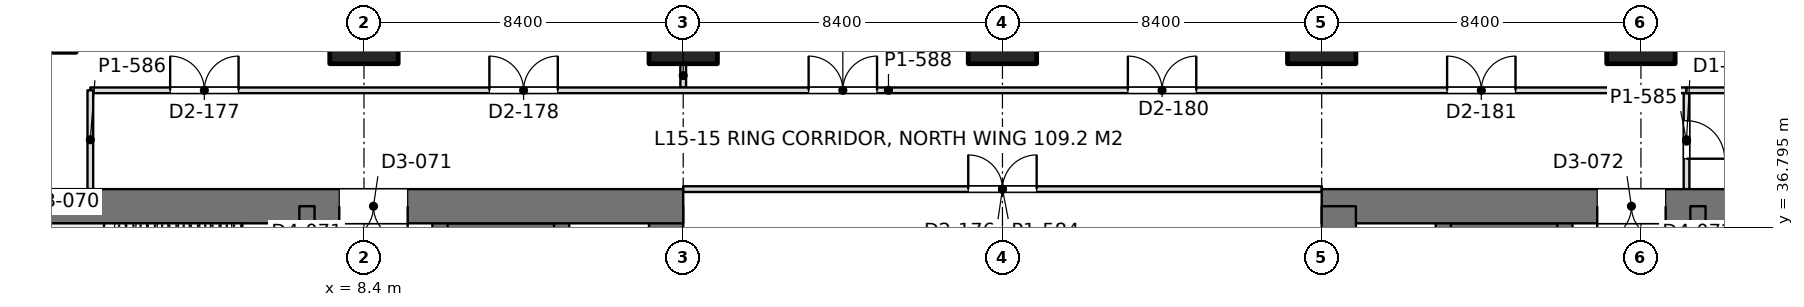
"""IFC4 building model, lengths in metres.
Left out: names, types, materials, properties, quantities, classifications, styles, units other than length and angle.
Written with IfcOpenShell. Run it as: python <this file> out.ifc"""

import sys

from ifc_helpers import new_model, si_unit, direction, frame, frame_2d, origin, origin_2d, place, context, subcontext, project, spatial, rectangle, extrude, element, fill, save


model = new_model("IFC4")
c1 = context("Model", 3, precision=1e-05, world=origin(), true_north=direction((0.0, 1.0)))
c2 = subcontext(c1, "Body", "Model", "MODEL_VIEW")
j1 = project(units=[si_unit("LENGTHUNIT", "METRE"), si_unit("PLANEANGLEUNIT", "RADIAN")], contexts=[c1])
p1 = place(None, origin())
s1 = spatial("IfcSite", under=j1, at=p1, CompositionType="ELEMENT")
p2 = place(p1, origin())
s2 = spatial("IfcBuilding", under=s1, at=p2, CompositionType="ELEMENT")
p3 = place(p2, frame((0.0, 0.0, 68.4)))
s3 = spatial("IfcBuildingStorey", under=s2, at=p3, CompositionType="ELEMENT", Elevation=68.4)
for number, where, z_axis, x_axis in (
    (1, (8.4, 42.0, 0.0), (0.0, 0.0, 1.0), (1.0, 0.0, 0.0)),
    (2, (16.8, 42.0, 0.0), (0.0, 0.0, 1.0), (1.0, 0.0, 0.0)),
    (3, (25.2, 42.0, 0.0), (0.0, 0.0, 1.0), (1.0, 0.0, 0.0)),
    (4, (33.6, 42.0, 0.0), (0.0, 0.0, 1.0), (1.0, 0.0, 0.0)),
    (5, (42.0, 42.0, 0.0), (0.0, 0.0, 1.0), (1.0, 0.0, 0.0)),
):
    element("IfcColumn", number, at=place(p3, frame(where, z_axis=z_axis, x_axis=x_axis)), inside=s3, PredefinedType="COLUMN", context=c2, shape_type="SweptSolid", body=[
        extrude(rectangle(XDim=1.8, YDim=1.8, at=origin_2d()), origin(), (0.0, 0.0, 1.0), 4.5),
    ])
p4 = place(p3, frame((-1.2, 37.35, 0.0), z_axis=(0.0, 0.0, 1.0), x_axis=(1.0, 0.0, 0.0)))
e6 = element("IfcWall", 6, at=p4, inside=s3, PredefinedType="SHEAR", context=c2, shape_type="SweptSolid", body=[
    extrude(rectangle(XDim=18.0, YDim=0.9, at=frame_2d((9.0, 0.0))), origin(), (0.0, 0.0, 1.0), 4.5),
])
p5 = place(p4, frame((8.95, 0.0, 0.0)))
e7 = element("IfcOpeningElement", 7, at=p5, cuts=e6, PredefinedType="OPENING", context=c2, shape_type="SweptSolid", body=[
    extrude(rectangle(XDim=1.8, YDim=2.4, at=frame_2d((0.9, 1.2))), frame((0.0, 0.46, 0.0), z_axis=(0.0, -1.0, 0.0), x_axis=(1.0, 0.0, 0.0)), (0.0, 0.0, 1.0), 0.92),
])
p6 = place(p3, frame((16.35, 13.05, 0.0), z_axis=(0.0, 0.0, 1.0), x_axis=(0.0, 1.0, 0.0)))
e8 = element("IfcWall", 8, at=p6, inside=s3, PredefinedType="SHEAR", context=c2, shape_type="SweptSolid", body=[
    extrude(rectangle(XDim=24.3, YDim=0.9, at=frame_2d((12.15, 0.0))), origin(), (0.0, 0.0, 1.0), 4.5),
])
p7 = place(p3, frame((6.9, 13.05, 0.0), z_axis=(0.0, 0.0, 1.0), x_axis=(0.0, 1.0, 0.0)))
e9 = element("IfcWall", 9, at=p7, inside=s3, PredefinedType="SHEAR", context=c2, shape_type="SweptSolid", body=[
    extrude(rectangle(XDim=24.3, YDim=0.4, at=frame_2d((12.15, 0.0))), origin(), (0.0, 0.0, 1.0), 4.5),
])
p8 = place(p7, frame((1.3, 0.0, 0.0)))
e10 = element("IfcOpeningElement", 10, at=p8, cuts=e9, PredefinedType="OPENING", context=c2, shape_type="SweptSolid", body=[
    extrude(rectangle(XDim=1.0, YDim=2.2, at=frame_2d((0.5, 1.1))), frame((0.0, 0.21, 0.0), z_axis=(0.0, -1.0, 0.0), x_axis=(1.0, 0.0, 0.0)), (0.0, 0.0, 1.0), 0.42),
])
p9 = place(p7, frame((22.0, 0.0, 0.0)))
e11 = element("IfcOpeningElement", 11, at=p9, cuts=e9, PredefinedType="OPENING", context=c2, shape_type="SweptSolid", body=[
    extrude(rectangle(XDim=1.0, YDim=2.2, at=frame_2d((0.5, 1.1))), frame((0.0, 0.21, 0.0), z_axis=(0.0, -1.0, 0.0), x_axis=(1.0, 0.0, 0.0)), (0.0, 0.0, 1.0), 0.42),
])
p10 = place(p7, frame((5.55, 0.0, 0.0)))
e12 = element("IfcOpeningElement", 12, at=p10, cuts=e9, PredefinedType="OPENING", context=c2, shape_type="SweptSolid", body=[
    extrude(rectangle(XDim=1.0, YDim=2.2, at=frame_2d((0.5, 1.1))), frame((0.0, 0.21, 0.0), z_axis=(0.0, -1.0, 0.0), x_axis=(1.0, 0.0, 0.0)), (0.0, 0.0, 1.0), 0.42),
])
p11 = place(p7, frame((9.55, 0.0, 0.0)))
e13 = element("IfcOpeningElement", 13, at=p11, cuts=e9, PredefinedType="OPENING", context=c2, shape_type="SweptSolid", body=[
    extrude(rectangle(XDim=1.0, YDim=2.2, at=frame_2d((0.5, 1.1))), frame((0.0, 0.21, 0.0), z_axis=(0.0, -1.0, 0.0), x_axis=(1.0, 0.0, 0.0)), (0.0, 0.0, 1.0), 0.42),
])
p12 = place(p7, frame((12.8, 0.0, 0.0)))
e14 = element("IfcOpeningElement", 14, at=p12, cuts=e9, PredefinedType="OPENING", context=c2, shape_type="SweptSolid", body=[
    extrude(rectangle(XDim=1.1, YDim=2.2, at=frame_2d((0.55, 1.1))), frame((0.0, 0.21, 0.0), z_axis=(0.0, -1.0, 0.0), x_axis=(1.0, 0.0, 0.0)), (0.0, 0.0, 1.0), 0.42),
])
p13 = place(p7, frame((15.538, 0.0, 0.0)))
e15 = element("IfcOpeningElement", 15, at=p13, cuts=e9, PredefinedType="OPENING", context=c2, shape_type="SweptSolid", body=[
    extrude(rectangle(XDim=1.1, YDim=2.2, at=frame_2d((0.55, 1.1))), frame((0.0, 0.21, 0.0), z_axis=(0.0, -1.0, 0.0), x_axis=(1.0, 0.0, 0.0)), (0.0, 0.0, 1.0), 0.42),
])
p14 = place(p7, frame((18.262, 0.0, 0.0)))
e16 = element("IfcOpeningElement", 16, at=p14, cuts=e9, PredefinedType="OPENING", context=c2, shape_type="SweptSolid", body=[
    extrude(rectangle(XDim=1.1, YDim=2.2, at=frame_2d((0.55, 1.1))), frame((0.0, 0.21, 0.0), z_axis=(0.0, -1.0, 0.0), x_axis=(1.0, 0.0, 0.0)), (0.0, 0.0, 1.0), 0.42),
])
p15 = place(p3, frame((10.4, 13.05, 0.0), z_axis=(0.0, 0.0, 1.0), x_axis=(0.0, 1.0, 0.0)))
e17 = element("IfcWall", 17, at=p15, inside=s3, PredefinedType="SHEAR", context=c2, shape_type="SweptSolid", body=[
    extrude(rectangle(XDim=24.3, YDim=0.4, at=frame_2d((12.15, 0.0))), origin(), (0.0, 0.0, 1.0), 4.5),
])
p16 = place(p15, frame((1.5, 0.0, 0.0)))
e18 = element("IfcOpeningElement", 18, at=p16, cuts=e17, PredefinedType="OPENING", context=c2, shape_type="SweptSolid", body=[
    extrude(rectangle(XDim=1.1, YDim=2.2, at=frame_2d((0.55, 1.1))), frame((0.0, 0.21, 0.0), z_axis=(0.0, -1.0, 0.0), x_axis=(1.0, 0.0, 0.0)), (0.0, 0.0, 1.0), 0.42),
])
p17 = place(p15, frame((4.35, 0.0, 0.0)))
e19 = element("IfcOpeningElement", 19, at=p17, cuts=e17, PredefinedType="OPENING", context=c2, shape_type="SweptSolid", body=[
    extrude(rectangle(XDim=1.1, YDim=2.2, at=frame_2d((0.55, 1.1))), frame((0.0, 0.21, 0.0), z_axis=(0.0, -1.0, 0.0), x_axis=(1.0, 0.0, 0.0)), (0.0, 0.0, 1.0), 0.42),
])
p18 = place(p15, frame((7.2, 0.0, 0.0)))
e20 = element("IfcOpeningElement", 20, at=p18, cuts=e17, PredefinedType="OPENING", context=c2, shape_type="SweptSolid", body=[
    extrude(rectangle(XDim=1.1, YDim=2.2, at=frame_2d((0.55, 1.1))), frame((0.0, 0.21, 0.0), z_axis=(0.0, -1.0, 0.0), x_axis=(1.0, 0.0, 0.0)), (0.0, 0.0, 1.0), 0.42),
])
p19 = place(p15, frame((21.45, 0.0, 0.0)))
e21 = element("IfcOpeningElement", 21, at=p19, cuts=e17, PredefinedType="OPENING", context=c2, shape_type="SweptSolid", body=[
    extrude(rectangle(XDim=1.1, YDim=2.2, at=frame_2d((0.55, 1.1))), frame((0.0, 0.21, 0.0), z_axis=(0.0, -1.0, 0.0), x_axis=(1.0, 0.0, 0.0)), (0.0, 0.0, 1.0), 0.42),
])
p20 = place(p3, frame((13.6, 13.05, 0.0), z_axis=(0.0, 0.0, 1.0), x_axis=(0.0, 1.0, 0.0)))
e22 = element("IfcWall", 22, at=p20, inside=s3, PredefinedType="SHEAR", context=c2, shape_type="SweptSolid", body=[
    extrude(rectangle(XDim=24.3, YDim=0.4, at=frame_2d((12.15, 0.0))), origin(), (0.0, 0.0, 1.0), 4.5),
])
p21 = place(p3, frame((10.4, 36.625, 0.0), z_axis=(0.0, 0.0, 1.0), x_axis=(1.0, 0.0, 0.0)))
e23 = element("IfcWall", 23, at=p21, inside=s3, PredefinedType="SHEAR", context=c2, shape_type="SweptSolid", body=[
    extrude(rectangle(XDim=3.2, YDim=0.55, at=frame_2d((1.6, 0.0))), origin(), (0.0, 0.0, 1.0), 4.5),
])
p22 = place(p3, frame((33.6, 37.35, 0.0), z_axis=(0.0, 0.0, 1.0), x_axis=(1.0, 0.0, 0.0)))
e24 = element("IfcWall", 24, at=p22, inside=s3, PredefinedType="SHEAR", context=c2, shape_type="SweptSolid", body=[
    extrude(rectangle(XDim=18.0, YDim=0.9, at=frame_2d((9.0, 0.0))), origin(), (0.0, 0.0, 1.0), 4.5),
])
p23 = place(p22, frame((7.25, 0.0, 0.0)))
e25 = element("IfcOpeningElement", 25, at=p23, cuts=e24, PredefinedType="OPENING", context=c2, shape_type="SweptSolid", body=[
    extrude(rectangle(XDim=1.8, YDim=2.4, at=frame_2d((0.9, 1.2))), frame((0.0, 0.46, 0.0), z_axis=(0.0, -1.0, 0.0), x_axis=(1.0, 0.0, 0.0)), (0.0, 0.0, 1.0), 0.92),
])
p24 = place(p3, frame((34.05, 13.05, 0.0), z_axis=(0.0, 0.0, 1.0), x_axis=(0.0, 1.0, 0.0)))
e26 = element("IfcWall", 26, at=p24, inside=s3, PredefinedType="SHEAR", context=c2, shape_type="SweptSolid", body=[
    extrude(rectangle(XDim=24.3, YDim=0.9, at=frame_2d((12.15, 0.0))), origin(), (0.0, 0.0, 1.0), 4.5),
])
p25 = place(p3, frame((43.5, 13.05, 0.0), z_axis=(0.0, 0.0, 1.0), x_axis=(0.0, 1.0, 0.0)))
e27 = element("IfcWall", 27, at=p25, inside=s3, PredefinedType="SHEAR", context=c2, shape_type="SweptSolid", body=[
    extrude(rectangle(XDim=24.3, YDim=0.4, at=frame_2d((12.15, 0.0))), origin(), (0.0, 0.0, 1.0), 4.5),
])
p26 = place(p25, frame((1.3, 0.0, 0.0)))
e28 = element("IfcOpeningElement", 28, at=p26, cuts=e27, PredefinedType="OPENING", context=c2, shape_type="SweptSolid", body=[
    extrude(rectangle(XDim=1.0, YDim=2.2, at=frame_2d((0.5, 1.1))), frame((0.0, 0.21, 0.0), z_axis=(0.0, -1.0, 0.0), x_axis=(1.0, 0.0, 0.0)), (0.0, 0.0, 1.0), 0.42),
])
p27 = place(p25, frame((22.0, 0.0, 0.0)))
e29 = element("IfcOpeningElement", 29, at=p27, cuts=e27, PredefinedType="OPENING", context=c2, shape_type="SweptSolid", body=[
    extrude(rectangle(XDim=1.0, YDim=2.2, at=frame_2d((0.5, 1.1))), frame((0.0, 0.21, 0.0), z_axis=(0.0, -1.0, 0.0), x_axis=(1.0, 0.0, 0.0)), (0.0, 0.0, 1.0), 0.42),
])
p28 = place(p25, frame((5.55, 0.0, 0.0)))
e30 = element("IfcOpeningElement", 30, at=p28, cuts=e27, PredefinedType="OPENING", context=c2, shape_type="SweptSolid", body=[
    extrude(rectangle(XDim=1.0, YDim=2.2, at=frame_2d((0.5, 1.1))), frame((0.0, 0.21, 0.0), z_axis=(0.0, -1.0, 0.0), x_axis=(1.0, 0.0, 0.0)), (0.0, 0.0, 1.0), 0.42),
])
p29 = place(p25, frame((9.55, 0.0, 0.0)))
e31 = element("IfcOpeningElement", 31, at=p29, cuts=e27, PredefinedType="OPENING", context=c2, shape_type="SweptSolid", body=[
    extrude(rectangle(XDim=1.0, YDim=2.2, at=frame_2d((0.5, 1.1))), frame((0.0, 0.21, 0.0), z_axis=(0.0, -1.0, 0.0), x_axis=(1.0, 0.0, 0.0)), (0.0, 0.0, 1.0), 0.42),
])
p30 = place(p25, frame((12.8, 0.0, 0.0)))
e32 = element("IfcOpeningElement", 32, at=p30, cuts=e27, PredefinedType="OPENING", context=c2, shape_type="SweptSolid", body=[
    extrude(rectangle(XDim=1.1, YDim=2.2, at=frame_2d((0.55, 1.1))), frame((0.0, 0.21, 0.0), z_axis=(0.0, -1.0, 0.0), x_axis=(1.0, 0.0, 0.0)), (0.0, 0.0, 1.0), 0.42),
])
p31 = place(p25, frame((15.538, 0.0, 0.0)))
e33 = element("IfcOpeningElement", 33, at=p31, cuts=e27, PredefinedType="OPENING", context=c2, shape_type="SweptSolid", body=[
    extrude(rectangle(XDim=1.1, YDim=2.2, at=frame_2d((0.55, 1.1))), frame((0.0, 0.21, 0.0), z_axis=(0.0, -1.0, 0.0), x_axis=(1.0, 0.0, 0.0)), (0.0, 0.0, 1.0), 0.42),
])
p32 = place(p25, frame((18.262, 0.0, 0.0)))
e34 = element("IfcOpeningElement", 34, at=p32, cuts=e27, PredefinedType="OPENING", context=c2, shape_type="SweptSolid", body=[
    extrude(rectangle(XDim=1.1, YDim=2.2, at=frame_2d((0.55, 1.1))), frame((0.0, 0.21, 0.0), z_axis=(0.0, -1.0, 0.0), x_axis=(1.0, 0.0, 0.0)), (0.0, 0.0, 1.0), 0.42),
])
p33 = place(p3, frame((40.0, 13.05, 0.0), z_axis=(0.0, 0.0, 1.0), x_axis=(0.0, 1.0, 0.0)))
e35 = element("IfcWall", 35, at=p33, inside=s3, PredefinedType="SHEAR", context=c2, shape_type="SweptSolid", body=[
    extrude(rectangle(XDim=24.3, YDim=0.4, at=frame_2d((12.15, 0.0))), origin(), (0.0, 0.0, 1.0), 4.5),
])
p34 = place(p33, frame((1.5, 0.0, 0.0)))
e36 = element("IfcOpeningElement", 36, at=p34, cuts=e35, PredefinedType="OPENING", context=c2, shape_type="SweptSolid", body=[
    extrude(rectangle(XDim=1.1, YDim=2.2, at=frame_2d((0.55, 1.1))), frame((0.0, 0.21, 0.0), z_axis=(0.0, -1.0, 0.0), x_axis=(1.0, 0.0, 0.0)), (0.0, 0.0, 1.0), 0.42),
])
p35 = place(p33, frame((4.35, 0.0, 0.0)))
e37 = element("IfcOpeningElement", 37, at=p35, cuts=e35, PredefinedType="OPENING", context=c2, shape_type="SweptSolid", body=[
    extrude(rectangle(XDim=1.1, YDim=2.2, at=frame_2d((0.55, 1.1))), frame((0.0, 0.21, 0.0), z_axis=(0.0, -1.0, 0.0), x_axis=(1.0, 0.0, 0.0)), (0.0, 0.0, 1.0), 0.42),
])
p36 = place(p33, frame((7.2, 0.0, 0.0)))
e38 = element("IfcOpeningElement", 38, at=p36, cuts=e35, PredefinedType="OPENING", context=c2, shape_type="SweptSolid", body=[
    extrude(rectangle(XDim=1.1, YDim=2.2, at=frame_2d((0.55, 1.1))), frame((0.0, 0.21, 0.0), z_axis=(0.0, -1.0, 0.0), x_axis=(1.0, 0.0, 0.0)), (0.0, 0.0, 1.0), 0.42),
])
p37 = place(p33, frame((21.45, 0.0, 0.0)))
e39 = element("IfcOpeningElement", 39, at=p37, cuts=e35, PredefinedType="OPENING", context=c2, shape_type="SweptSolid", body=[
    extrude(rectangle(XDim=1.1, YDim=2.2, at=frame_2d((0.55, 1.1))), frame((0.0, 0.21, 0.0), z_axis=(0.0, -1.0, 0.0), x_axis=(1.0, 0.0, 0.0)), (0.0, 0.0, 1.0), 0.42),
])
p38 = place(p3, frame((36.8, 13.05, 0.0), z_axis=(0.0, 0.0, 1.0), x_axis=(0.0, 1.0, 0.0)))
e40 = element("IfcWall", 40, at=p38, inside=s3, PredefinedType="SHEAR", context=c2, shape_type="SweptSolid", body=[
    extrude(rectangle(XDim=24.3, YDim=0.4, at=frame_2d((12.15, 0.0))), origin(), (0.0, 0.0, 1.0), 4.5),
])
p39 = place(p3, frame((40.0, 36.625, 0.0), z_axis=(0.0, 0.0, 1.0), x_axis=(-1.0, 0.0, 0.0)))
e41 = element("IfcWall", 41, at=p39, inside=s3, PredefinedType="SHEAR", context=c2, shape_type="SweptSolid", body=[
    extrude(rectangle(XDim=3.2, YDim=0.55, at=frame_2d((1.6, 0.0))), origin(), (0.0, 0.0, 1.0), 4.5),
])
p40 = place(p3, frame((16.8, 40.474, 0.0), z_axis=(0.0, 0.0, 1.0), x_axis=(0.0, 1.0, 0.0)))
e42 = element("IfcWall", 42, at=p40, inside=s3, PredefinedType="PARTITIONING", context=c2, shape_type="SweptSolid", body=[
    extrude(rectangle(XDim=0.627, YDim=0.15, at=frame_2d((0.313, 0.0))), origin(), (0.0, 0.0, 1.0), 3.98),
])
p41 = place(p3, frame((1.2, 40.4, 0.0), z_axis=(0.0, 0.0, 1.0), x_axis=(1.0, 0.0, 0.0)))
e43 = element("IfcWall", 43, at=p41, inside=s3, PredefinedType="PARTITIONING", context=c2, shape_type="SweptSolid", body=[
    extrude(rectangle(XDim=42.002, YDim=0.15, at=frame_2d((21.001, 0.0))), origin(), (0.0, 0.0, 1.0), 3.74),
])
p42 = place(p41, frame((2.1, 0.0, 0.0)))
e44 = element("IfcOpeningElement", 44, at=p42, cuts=e43, PredefinedType="OPENING", context=c2, shape_type="SweptSolid", body=[
    extrude(rectangle(XDim=1.8, YDim=2.2, at=frame_2d((0.9, 1.1))), frame((0.0, 0.085, 0.0), z_axis=(0.0, -1.0, 0.0), x_axis=(1.0, 0.0, 0.0)), (0.0, 0.0, 1.0), 0.17),
])
p43 = place(p41, frame((10.5, 0.0, 0.0)))
e45 = element("IfcOpeningElement", 45, at=p43, cuts=e43, PredefinedType="OPENING", context=c2, shape_type="SweptSolid", body=[
    extrude(rectangle(XDim=1.8, YDim=2.2, at=frame_2d((0.9, 1.1))), frame((0.0, 0.085, 0.0), z_axis=(0.0, -1.0, 0.0), x_axis=(1.0, 0.0, 0.0)), (0.0, 0.0, 1.0), 0.17),
])
p44 = place(p41, frame((18.9, 0.0, 0.0)))
e46 = element("IfcOpeningElement", 46, at=p44, cuts=e43, PredefinedType="OPENING", context=c2, shape_type="SweptSolid", body=[
    extrude(rectangle(XDim=1.8, YDim=2.2, at=frame_2d((0.9, 1.1))), frame((0.0, 0.085, 0.0), z_axis=(0.0, -1.0, 0.0), x_axis=(1.0, 0.0, 0.0)), (0.0, 0.0, 1.0), 0.17),
])
p45 = place(p41, frame((27.3, 0.0, 0.0)))
e47 = element("IfcOpeningElement", 47, at=p45, cuts=e43, PredefinedType="OPENING", context=c2, shape_type="SweptSolid", body=[
    extrude(rectangle(XDim=1.8, YDim=2.2, at=frame_2d((0.9, 1.1))), frame((0.0, 0.085, 0.0), z_axis=(0.0, -1.0, 0.0), x_axis=(1.0, 0.0, 0.0)), (0.0, 0.0, 1.0), 0.17),
])
p46 = place(p41, frame((35.7, 0.0, 0.0)))
e48 = element("IfcOpeningElement", 48, at=p46, cuts=e43, PredefinedType="OPENING", context=c2, shape_type="SweptSolid", body=[
    extrude(rectangle(XDim=1.8, YDim=2.2, at=frame_2d((0.9, 1.1))), frame((0.0, 0.085, 0.0), z_axis=(0.0, -1.0, 0.0), x_axis=(1.0, 0.0, 0.0)), (0.0, 0.0, 1.0), 0.17),
])
p47 = place(p3, frame((1.2, 37.8, 0.0), z_axis=(0.0, 0.0, 1.0), x_axis=(0.0, 1.0, 0.0)))
e49 = element("IfcWall", 49, at=p47, inside=s3, PredefinedType="PARTITIONING", context=c2, shape_type="SweptSolid", body=[
    extrude(rectangle(XDim=2.6, YDim=0.15, at=frame_2d((1.3, 0.0))), origin(), (0.0, 0.0, 1.0), 4.34),
])
p48 = place(p3, frame((43.2, 37.8, 0.0), z_axis=(0.0, 0.0, 1.0), x_axis=(0.0, 1.0, 0.0)))
e50 = element("IfcWall", 50, at=p48, inside=s3, PredefinedType="PARTITIONING", context=c2, shape_type="SweptSolid", body=[
    extrude(rectangle(XDim=2.526, YDim=0.15, at=frame_2d((1.263, 0.0))), origin(), (0.0, 0.0, 1.0), 4.34),
])
p49 = place(p48, frame((0.8, 0.0, 0.0)))
e51 = element("IfcOpeningElement", 51, at=p49, cuts=e50, PredefinedType="OPENING", context=c2, shape_type="SweptSolid", body=[
    extrude(rectangle(XDim=1.0, YDim=2.2, at=frame_2d((0.5, 1.1))), frame((0.0, 0.085, 0.0), z_axis=(0.0, -1.0, 0.0), x_axis=(1.0, 0.0, 0.0)), (0.0, 0.0, 1.0), 0.17),
])
p50 = place(p3, frame((43.198, 40.4, 0.0), z_axis=(0.0, 0.0, 1.0), x_axis=(1.0, 0.0, 0.0)))
e52 = element("IfcWall", 52, at=p50, inside=s3, PredefinedType="PARTITIONING", context=c2, shape_type="SweptSolid", body=[
    extrude(rectangle(XDim=6.002, YDim=0.15, at=frame_2d((3.001, 0.0))), origin(), (0.0, 0.0, 1.0), 3.98),
])
p51 = place(p3, frame((16.798, 37.8, 0.0), z_axis=(0.0, 0.0, 1.0), x_axis=(1.0, 0.0, 0.0)))
e53 = element("IfcWall", 53, at=p51, inside=s3, PredefinedType="PARTITIONING", context=c2, shape_type="SweptSolid", body=[
    extrude(rectangle(XDim=16.804, YDim=0.15, at=frame_2d((8.402, 0.0))), origin(), (0.0, 0.0, 1.0), 3.74),
])
p52 = place(p51, frame((7.502, 0.0, 0.0)))
e54 = element("IfcOpeningElement", 54, at=p52, cuts=e53, PredefinedType="OPENING", context=c2, shape_type="SweptSolid", body=[
    extrude(rectangle(XDim=1.8, YDim=2.2, at=frame_2d((0.9, 1.1))), frame((0.0, 0.085, 0.0), z_axis=(0.0, -1.0, 0.0), x_axis=(1.0, 0.0, 0.0)), (0.0, 0.0, 1.0), 0.17),
])
p53 = place(p5, frame((1.8, 0.0, 0.0), z_axis=(0.0, 0.0, 1.0), x_axis=(-1.0, 0.0, 0.0)))
e55 = element("IfcDoor", 55, at=p53, inside=s3, OperationType="DOUBLE_DOOR_SINGLE_SWING", PredefinedType="DOOR", context=c2, shape_type="SweptSolid", body=[
    extrude(rectangle(XDim=1.8, YDim=2.4, at=frame_2d((0.9, 1.2))), frame((0.0, 0.025, 0.0), z_axis=(0.0, -1.0, 0.0), x_axis=(1.0, 0.0, 0.0)), (0.0, 0.0, 1.0), 0.05),
])
fill(e7, e55)
p54 = place(p23, frame((1.8, 0.0, 0.0), z_axis=(0.0, 0.0, 1.0), x_axis=(-1.0, 0.0, 0.0)))
e56 = element("IfcDoor", 56, at=p54, inside=s3, OperationType="DOUBLE_DOOR_SINGLE_SWING", PredefinedType="DOOR", context=c2, shape_type="SweptSolid", body=[
    extrude(rectangle(XDim=1.8, YDim=2.4, at=frame_2d((0.9, 1.2))), frame((0.0, 0.025, 0.0), z_axis=(0.0, -1.0, 0.0), x_axis=(1.0, 0.0, 0.0)), (0.0, 0.0, 1.0), 0.05),
])
fill(e25, e56)
p55 = place(p42, origin())
e57 = element("IfcDoor", 57, at=p55, inside=s3, OperationType="DOUBLE_DOOR_SINGLE_SWING", PredefinedType="DOOR", context=c2, shape_type="SweptSolid", body=[
    extrude(rectangle(XDim=1.8, YDim=2.2, at=frame_2d((0.9, 1.1))), frame((0.0, 0.025, 0.0), z_axis=(0.0, -1.0, 0.0), x_axis=(1.0, 0.0, 0.0)), (0.0, 0.0, 1.0), 0.05),
])
fill(e44, e57)
p56 = place(p43, origin())
e58 = element("IfcDoor", 58, at=p56, inside=s3, OperationType="DOUBLE_DOOR_SINGLE_SWING", PredefinedType="DOOR", context=c2, shape_type="SweptSolid", body=[
    extrude(rectangle(XDim=1.8, YDim=2.2, at=frame_2d((0.9, 1.1))), frame((0.0, 0.025, 0.0), z_axis=(0.0, -1.0, 0.0), x_axis=(1.0, 0.0, 0.0)), (0.0, 0.0, 1.0), 0.05),
])
fill(e45, e58)
p57 = place(p44, origin())
e59 = element("IfcDoor", 59, at=p57, inside=s3, OperationType="DOUBLE_DOOR_SINGLE_SWING", PredefinedType="DOOR", context=c2, shape_type="SweptSolid", body=[
    extrude(rectangle(XDim=1.8, YDim=2.2, at=frame_2d((0.9, 1.1))), frame((0.0, 0.025, 0.0), z_axis=(0.0, -1.0, 0.0), x_axis=(1.0, 0.0, 0.0)), (0.0, 0.0, 1.0), 0.05),
])
fill(e46, e59)
p58 = place(p45, origin())
e60 = element("IfcDoor", 60, at=p58, inside=s3, OperationType="DOUBLE_DOOR_SINGLE_SWING", PredefinedType="DOOR", context=c2, shape_type="SweptSolid", body=[
    extrude(rectangle(XDim=1.8, YDim=2.2, at=frame_2d((0.9, 1.1))), frame((0.0, 0.025, 0.0), z_axis=(0.0, -1.0, 0.0), x_axis=(1.0, 0.0, 0.0)), (0.0, 0.0, 1.0), 0.05),
])
fill(e47, e60)
p59 = place(p46, origin())
e61 = element("IfcDoor", 61, at=p59, inside=s3, OperationType="DOUBLE_DOOR_SINGLE_SWING", PredefinedType="DOOR", context=c2, shape_type="SweptSolid", body=[
    extrude(rectangle(XDim=1.8, YDim=2.2, at=frame_2d((0.9, 1.1))), frame((0.0, 0.025, 0.0), z_axis=(0.0, -1.0, 0.0), x_axis=(1.0, 0.0, 0.0)), (0.0, 0.0, 1.0), 0.05),
])
fill(e48, e61)
p60 = place(p49, frame((1.0, 0.0, 0.0), z_axis=(0.0, 0.0, 1.0), x_axis=(-1.0, 0.0, 0.0)))
e62 = element("IfcDoor", 62, at=p60, inside=s3, OperationType="SINGLE_SWING_RIGHT", PredefinedType="DOOR", context=c2, shape_type="SweptSolid", body=[
    extrude(rectangle(XDim=1.0, YDim=2.2, at=frame_2d((0.5, 1.1))), frame((0.0, 0.025, 0.0), z_axis=(0.0, -1.0, 0.0), x_axis=(1.0, 0.0, 0.0)), (0.0, 0.0, 1.0), 0.05),
])
fill(e51, e62)
p61 = place(p52, origin())
e63 = element("IfcDoor", 63, at=p61, inside=s3, OperationType="DOUBLE_DOOR_SINGLE_SWING", PredefinedType="DOOR", context=c2, shape_type="SweptSolid", body=[
    extrude(rectangle(XDim=1.8, YDim=2.2, at=frame_2d((0.9, 1.1))), frame((0.0, 0.025, 0.0), z_axis=(0.0, -1.0, 0.0), x_axis=(1.0, 0.0, 0.0)), (0.0, 0.0, 1.0), 0.05),
])
fill(e54, e63)
save(model, sys.argv[1])
